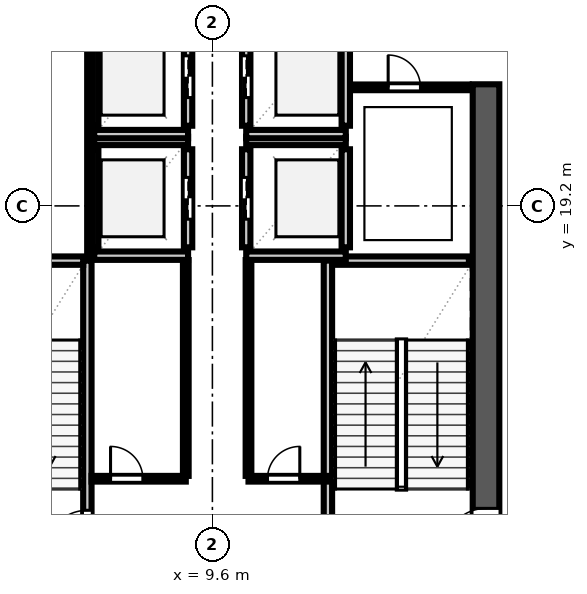
"""IFC4 building model, lengths in metres.
Left out: names, types, materials, properties, quantities, classifications, styles, units other than length and angle.
Written with IfcOpenShell. Run it as: python <this file> out.ifc"""

import sys

from ifc_helpers import new_model, si_unit, direction, frame, frame_2d, origin, place, context, subcontext, project, spatial, rectangle, extrude, element, fill, save


model = new_model("IFC4")
c1 = context("Model", 3, precision=1e-05, world=origin(), true_north=direction((0.0, 1.0)))
c2 = subcontext(c1, "Body", "Model", "MODEL_VIEW")
j1 = project(units=[si_unit("LENGTHUNIT", "METRE"), si_unit("PLANEANGLEUNIT", "RADIAN")], contexts=[c1])
p1 = place(None, origin())
s1 = spatial("IfcSite", under=j1, at=p1, CompositionType="ELEMENT")
p2 = place(p1, origin())
s2 = spatial("IfcBuilding", under=s1, at=p2, CompositionType="ELEMENT")
p3 = place(p2, frame((0.0, 0.0, 150.8)))
s3 = spatial("IfcBuildingStorey", under=s2, at=p3, CompositionType="ELEMENT", Elevation=150.8)
p4 = place(p3, frame((16.8, 9.95, 0.0), z_axis=(0.0, 0.0, 1.0), x_axis=(0.0, 1.0, 0.0)))
e1 = element("IfcWall", 1, at=p4, inside=s3, PredefinedType="SHEAR", context=c2, shape_type="SweptSolid", body=[
    extrude(rectangle(XDim=12.45, YDim=0.7, at=frame_2d((6.225, 0.0))), origin(), (0.0, 0.0, 1.0), 4.94),
])
p5 = place(p4, frame((0.19, 0.0, 0.0)))
e2 = element("IfcOpeningElement", 2, at=p5, cuts=e1, PredefinedType="OPENING", context=c2, shape_type="SweptSolid", body=[
    extrude(rectangle(XDim=1.1, YDim=2.2, at=frame_2d((0.55, 1.1))), frame((0.0, 0.362, 0.0), z_axis=(0.0, -1.0, 0.0), x_axis=(1.0, 0.0, 0.0)), (0.0, 0.0, 1.0), 0.724),
])
p6 = place(p3, frame((6.31, 9.95, 0.0), z_axis=(0.0, 0.0, 1.0), x_axis=(0.0, 1.0, 0.0)))
e3 = element("IfcWall", 3, at=p6, inside=s3, PredefinedType="SOLIDWALL", context=c2, shape_type="SweptSolid", body=[
    extrude(rectangle(XDim=7.81, YDim=0.22, at=frame_2d((3.905, 0.0))), origin(), (0.0, 0.0, 1.0), 4.94),
])
p7 = place(p6, frame((0.14, 0.0, 0.0)))
e4 = element("IfcOpeningElement", 4, at=p7, cuts=e3, PredefinedType="OPENING", context=c2, shape_type="SweptSolid", body=[
    extrude(rectangle(XDim=1.1, YDim=2.2, at=frame_2d((0.55, 1.1))), frame((0.0, 0.122, 0.0), z_axis=(0.0, -1.0, 0.0), x_axis=(1.0, 0.0, 0.0)), (0.0, 0.0, 1.0), 0.244),
])
p8 = place(p3, frame((2.65, 17.76, 0.0), z_axis=(0.0, 0.0, 1.0), x_axis=(1.0, 0.0, 0.0)))
e5 = element("IfcWall", 5, at=p8, inside=s3, PredefinedType="SOLIDWALL", context=c2, shape_type="SweptSolid", body=[
    extrude(rectangle(XDim=3.55, YDim=0.22, at=frame_2d((1.775, 0.0))), origin(), (0.0, 0.0, 1.0), 4.94),
])
p9 = place(p3, frame((12.64, 10.05, 0.0), z_axis=(0.0, 0.0, 1.0), x_axis=(0.0, 1.0, 0.0)))
e6 = element("IfcWall", 6, at=p9, inside=s3, PredefinedType="SOLIDWALL", context=c2, shape_type="SweptSolid", body=[
    extrude(rectangle(XDim=7.71, YDim=0.22, at=frame_2d((3.855, 0.0))), origin(), (0.0, 0.0, 1.0), 4.94),
])
p10 = place(p3, frame((12.75, 17.76, 0.0), z_axis=(0.0, 0.0, 1.0), x_axis=(1.0, 0.0, 0.0)))
e7 = element("IfcWall", 7, at=p10, inside=s3, PredefinedType="SOLIDWALL", context=c2, shape_type="SweptSolid", body=[
    extrude(rectangle(XDim=3.6, YDim=0.22, at=frame_2d((1.8, 0.0))), origin(), (0.0, 0.0, 1.0), 4.94),
])
p11 = place(p3, frame((6.49, 18.11, 0.0), z_axis=(0.0, 0.0, 1.0), x_axis=(0.0, 1.0, 0.0)))
e8 = element("IfcWall", 8, at=p11, inside=s3, PredefinedType="SOLIDWALL", context=c2, shape_type="SweptSolid", body=[
    extrude(rectangle(XDim=2.58, YDim=0.22, at=frame_2d((1.29, 0.0))), origin(), (0.0, 0.0, 1.0), 4.94),
])
p12 = place(p3, frame((8.96, 18.11, 0.0), z_axis=(0.0, 0.0, 1.0), x_axis=(0.0, 1.0, 0.0)))
e9 = element("IfcWall", 9, at=p12, inside=s3, PredefinedType="SOLIDWALL", context=c2, shape_type="SweptSolid", body=[
    extrude(rectangle(XDim=2.58, YDim=0.22, at=frame_2d((1.29, 0.0))), origin(), (0.0, 0.0, 1.0), 4.94),
])
p13 = place(p12, frame((0.74, 0.0, 0.0)))
e10 = element("IfcOpeningElement", 10, at=p13, cuts=e9, PredefinedType="OPENING", context=c2, shape_type="SweptSolid", body=[
    extrude(rectangle(XDim=1.1, YDim=2.2, at=frame_2d((0.55, 1.1))), frame((0.0, 0.122, 0.0), z_axis=(0.0, -1.0, 0.0), x_axis=(1.0, 0.0, 0.0)), (0.0, 0.0, 1.0), 0.244),
])
for number, where, z_axis, x_axis in (
    (11, (6.49, 17.89, 0.0), (0.0, 0.0, 1.0), (1.0, 0.0, 0.0)),
    (12, (6.49, 20.91, 0.0), (0.0, 0.0, 1.0), (1.0, 0.0, 0.0)),
):
    element("IfcWall", number, at=place(p3, frame(where, z_axis=z_axis, x_axis=x_axis)), inside=s3, PredefinedType="SOLIDWALL", context=c2, shape_type="SweptSolid", body=[
        extrude(rectangle(XDim=2.47, YDim=0.22, at=frame_2d((1.235, 0.0))), origin(), (0.0, 0.0, 1.0), 4.94),
    ])
p14 = place(p3, frame((6.49, 21.31, 0.0), z_axis=(0.0, 0.0, 1.0), x_axis=(0.0, 1.0, 0.0)))
e13 = element("IfcWall", 13, at=p14, inside=s3, PredefinedType="SOLIDWALL", context=c2, shape_type="SweptSolid", body=[
    extrude(rectangle(XDim=2.58, YDim=0.22, at=frame_2d((1.29, 0.0))), origin(), (0.0, 0.0, 1.0), 4.94),
])
p15 = place(p3, frame((8.96, 21.31, 0.0), z_axis=(0.0, 0.0, 1.0), x_axis=(0.0, 1.0, 0.0)))
e14 = element("IfcWall", 14, at=p15, inside=s3, PredefinedType="SOLIDWALL", context=c2, shape_type="SweptSolid", body=[
    extrude(rectangle(XDim=2.58, YDim=0.22, at=frame_2d((1.29, 0.0))), origin(), (0.0, 0.0, 1.0), 4.94),
])
p16 = place(p15, frame((0.74, 0.0, 0.0)))
e15 = element("IfcOpeningElement", 15, at=p16, cuts=e14, PredefinedType="OPENING", context=c2, shape_type="SweptSolid", body=[
    extrude(rectangle(XDim=1.1, YDim=2.2, at=frame_2d((0.55, 1.1))), frame((0.0, 0.122, 0.0), z_axis=(0.0, -1.0, 0.0), x_axis=(1.0, 0.0, 0.0)), (0.0, 0.0, 1.0), 0.244),
])
p17 = place(p3, frame((6.49, 21.09, 0.0), z_axis=(0.0, 0.0, 1.0), x_axis=(1.0, 0.0, 0.0)))
e16 = element("IfcWall", 16, at=p17, inside=s3, PredefinedType="SOLIDWALL", context=c2, shape_type="SweptSolid", body=[
    extrude(rectangle(XDim=2.47, YDim=0.22, at=frame_2d((1.235, 0.0))), origin(), (0.0, 0.0, 1.0), 4.94),
])
p18 = place(p3, frame((10.49, 18.11, 0.0), z_axis=(0.0, 0.0, 1.0), x_axis=(0.0, 1.0, 0.0)))
e17 = element("IfcWall", 17, at=p18, inside=s3, PredefinedType="SOLIDWALL", context=c2, shape_type="SweptSolid", body=[
    extrude(rectangle(XDim=2.58, YDim=0.22, at=frame_2d((1.29, 0.0))), origin(), (0.0, 0.0, 1.0), 4.94),
])
p19 = place(p18, frame((0.74, 0.0, 0.0)))
e18 = element("IfcOpeningElement", 18, at=p19, cuts=e17, PredefinedType="OPENING", context=c2, shape_type="SweptSolid", body=[
    extrude(rectangle(XDim=1.1, YDim=2.2, at=frame_2d((0.55, 1.1))), frame((0.0, 0.122, 0.0), z_axis=(0.0, -1.0, 0.0), x_axis=(1.0, 0.0, 0.0)), (0.0, 0.0, 1.0), 0.244),
])
p20 = place(p3, frame((13.11, 18.11, 0.0), z_axis=(0.0, 0.0, 1.0), x_axis=(0.0, 1.0, 0.0)))
e19 = element("IfcWall", 19, at=p20, inside=s3, PredefinedType="SOLIDWALL", context=c2, shape_type="SweptSolid", body=[
    extrude(rectangle(XDim=2.58, YDim=0.22, at=frame_2d((1.29, 0.0))), origin(), (0.0, 0.0, 1.0), 4.94),
])
for number, where, z_axis, x_axis in (
    (20, (10.49, 17.89, 0.0), (0.0, 0.0, 1.0), (1.0, 0.0, 0.0)),
    (21, (10.49, 20.91, 0.0), (0.0, 0.0, 1.0), (1.0, 0.0, 0.0)),
):
    element("IfcWall", number, at=place(p3, frame(where, z_axis=z_axis, x_axis=x_axis)), inside=s3, PredefinedType="SOLIDWALL", context=c2, shape_type="SweptSolid", body=[
        extrude(rectangle(XDim=2.62, YDim=0.22, at=frame_2d((1.31, 0.0))), origin(), (0.0, 0.0, 1.0), 4.94),
    ])
p21 = place(p3, frame((10.49, 21.31, 0.0), z_axis=(0.0, 0.0, 1.0), x_axis=(0.0, 1.0, 0.0)))
e22 = element("IfcWall", 22, at=p21, inside=s3, PredefinedType="SOLIDWALL", context=c2, shape_type="SweptSolid", body=[
    extrude(rectangle(XDim=2.58, YDim=0.22, at=frame_2d((1.29, 0.0))), origin(), (0.0, 0.0, 1.0), 4.94),
])
p22 = place(p21, frame((0.74, 0.0, 0.0)))
e23 = element("IfcOpeningElement", 23, at=p22, cuts=e22, PredefinedType="OPENING", context=c2, shape_type="SweptSolid", body=[
    extrude(rectangle(XDim=1.1, YDim=2.2, at=frame_2d((0.55, 1.1))), frame((0.0, 0.122, 0.0), z_axis=(0.0, -1.0, 0.0), x_axis=(1.0, 0.0, 0.0)), (0.0, 0.0, 1.0), 0.244),
])
p23 = place(p3, frame((13.11, 21.31, 0.0), z_axis=(0.0, 0.0, 1.0), x_axis=(0.0, 1.0, 0.0)))
e24 = element("IfcWall", 24, at=p23, inside=s3, PredefinedType="SOLIDWALL", context=c2, shape_type="SweptSolid", body=[
    extrude(rectangle(XDim=2.58, YDim=0.22, at=frame_2d((1.29, 0.0))), origin(), (0.0, 0.0, 1.0), 4.94),
])
p24 = place(p3, frame((10.49, 21.09, 0.0), z_axis=(0.0, 0.0, 1.0), x_axis=(1.0, 0.0, 0.0)))
e25 = element("IfcWall", 25, at=p24, inside=s3, PredefinedType="SOLIDWALL", context=c2, shape_type="SweptSolid", body=[
    extrude(rectangle(XDim=2.62, YDim=0.22, at=frame_2d((1.31, 0.0))), origin(), (0.0, 0.0, 1.0), 4.94),
])
p25 = place(p3, frame((6.42, 12.02, 0.0), z_axis=(0.0, 0.0, 1.0), x_axis=(1.0, 0.0, 0.0)))
e26 = element("IfcWall", 26, at=p25, inside=s3, PredefinedType="PARTITIONING", context=c2, shape_type="SweptSolid", body=[
    extrude(rectangle(XDim=2.48, YDim=0.15, at=frame_2d((1.24, 0.0))), origin(), (0.0, 0.0, 1.0), 4.94),
])
p26 = place(p25, frame((0.5, 0.0, 0.0)))
e27 = element("IfcOpeningElement", 27, at=p26, cuts=e26, PredefinedType="OPENING", context=c2, shape_type="SweptSolid", body=[
    extrude(rectangle(XDim=0.85, YDim=2.1, at=frame_2d((0.425, 1.05))), frame((0.0, 0.087, 0.0), z_axis=(0.0, -1.0, 0.0), x_axis=(1.0, 0.0, 0.0)), (0.0, 0.0, 1.0), 0.174),
])
p27 = place(p3, frame((10.55, 12.02, 0.0), z_axis=(0.0, 0.0, 1.0), x_axis=(1.0, 0.0, 0.0)))
e28 = element("IfcWall", 28, at=p27, inside=s3, PredefinedType="PARTITIONING", context=c2, shape_type="SweptSolid", body=[
    extrude(rectangle(XDim=2.08, YDim=0.15, at=frame_2d((1.04, 0.0))), origin(), (0.0, 0.0, 1.0), 4.94),
])
p28 = place(p27, frame((0.5, 0.0, 0.0)))
e29 = element("IfcOpeningElement", 29, at=p28, cuts=e28, PredefinedType="OPENING", context=c2, shape_type="SweptSolid", body=[
    extrude(rectangle(XDim=0.85, YDim=2.1, at=frame_2d((0.425, 1.05))), frame((0.0, 0.087, 0.0), z_axis=(0.0, -1.0, 0.0), x_axis=(1.0, 0.0, 0.0)), (0.0, 0.0, 1.0), 0.174),
])
for number, where, z_axis, x_axis in (
    (30, (8.9, 12.095, 0.0), (0.0, 0.0, 1.0), (0.0, 1.0, 0.0)),
    (31, (10.55, 12.095, 0.0), (0.0, 0.0, 1.0), (0.0, 1.0, 0.0)),
):
    element("IfcWall", number, at=place(p3, frame(where, z_axis=z_axis, x_axis=x_axis)), inside=s3, PredefinedType="PARTITIONING", context=c2, shape_type="SweptSolid", body=[
        extrude(rectangle(XDim=5.68, YDim=0.15, at=frame_2d((2.84, 0.0))), origin(), (0.0, 0.0, 1.0), 4.94),
    ])
p29 = place(p3, frame((13.225, 22.32, 0.0), z_axis=(0.0, 0.0, 1.0), x_axis=(1.0, 0.0, 0.0)))
e32 = element("IfcWall", 32, at=p29, inside=s3, PredefinedType="PARTITIONING", context=c2, shape_type="SweptSolid", body=[
    extrude(rectangle(XDim=3.12, YDim=0.15, at=frame_2d((1.56, 0.0))), origin(), (0.0, 0.0, 1.0), 4.94),
])
p30 = place(p29, frame((1.0, 0.0, 0.0)))
e33 = element("IfcOpeningElement", 33, at=p30, cuts=e32, PredefinedType="OPENING", context=c2, shape_type="SweptSolid", body=[
    extrude(rectangle(XDim=0.85, YDim=2.1, at=frame_2d((0.425, 1.05))), frame((0.0, 0.087, 0.0), z_axis=(0.0, -1.0, 0.0), x_axis=(1.0, 0.0, 0.0)), (0.0, 0.0, 1.0), 0.174),
])
p31 = place(p3, frame((6.38, 17.8, 0.0), z_axis=(0.0, 0.0, 1.0), x_axis=(0.0, 1.0, 0.0)))
e34 = element("IfcWall", 34, at=p31, inside=s3, PredefinedType="PARTITIONING", context=c2, shape_type="SweptSolid", body=[
    extrude(rectangle(XDim=18.98, YDim=0.15, at=frame_2d((9.49, 0.0))), origin(), (0.0, 0.0, 1.0), 4.94),
])
p32 = place(p31, frame((14.3, 0.0, 0.0)))
e35 = element("IfcOpeningElement", 35, at=p32, cuts=e34, PredefinedType="OPENING", context=c2, shape_type="SweptSolid", body=[
    extrude(rectangle(XDim=0.85, YDim=2.1, at=frame_2d((0.425, 1.05))), frame((0.0, 0.087, 0.0), z_axis=(0.0, -1.0, 0.0), x_axis=(1.0, 0.0, 0.0)), (0.0, 0.0, 1.0), 0.174),
])
p33 = place(p7, origin())
e36 = element("IfcDoor", 36, at=p33, inside=s3, OperationType="SINGLE_SWING_LEFT", PredefinedType="DOOR", context=c2, shape_type="SweptSolid", body=[
    extrude(rectangle(XDim=1.1, YDim=2.2, at=frame_2d((0.55, 1.1))), frame((0.0, 0.025, 0.0), z_axis=(0.0, -1.0, 0.0), x_axis=(1.0, 0.0, 0.0)), (0.0, 0.0, 1.0), 0.05),
])
fill(e4, e36)
p34 = place(p5, origin())
e37 = element("IfcDoor", 37, at=p34, inside=s3, OperationType="SINGLE_SWING_LEFT", PredefinedType="DOOR", context=c2, shape_type="SweptSolid", body=[
    extrude(rectangle(XDim=1.1, YDim=2.2, at=frame_2d((0.55, 1.1))), frame((0.0, 0.025, 0.0), z_axis=(0.0, -1.0, 0.0), x_axis=(1.0, 0.0, 0.0)), (0.0, 0.0, 1.0), 0.05),
])
fill(e2, e37)
p35 = place(p13, origin())
e38 = element("IfcDoor", 38, at=p35, inside=s3, OperationType="DOUBLE_DOOR_SLIDING", PredefinedType="DOOR", context=c2, shape_type="SweptSolid", body=[
    extrude(rectangle(XDim=1.1, YDim=2.2, at=frame_2d((0.55, 1.1))), frame((0.0, 0.025, 0.0), z_axis=(0.0, -1.0, 0.0), x_axis=(1.0, 0.0, 0.0)), (0.0, 0.0, 1.0), 0.05),
])
fill(e10, e38)
p36 = place(p16, origin())
e39 = element("IfcDoor", 39, at=p36, inside=s3, OperationType="DOUBLE_DOOR_SLIDING", PredefinedType="DOOR", context=c2, shape_type="SweptSolid", body=[
    extrude(rectangle(XDim=1.1, YDim=2.2, at=frame_2d((0.55, 1.1))), frame((0.0, 0.025, 0.0), z_axis=(0.0, -1.0, 0.0), x_axis=(1.0, 0.0, 0.0)), (0.0, 0.0, 1.0), 0.05),
])
fill(e15, e39)
p37 = place(p19, origin())
e40 = element("IfcDoor", 40, at=p37, inside=s3, OperationType="DOUBLE_DOOR_SLIDING", PredefinedType="DOOR", context=c2, shape_type="SweptSolid", body=[
    extrude(rectangle(XDim=1.1, YDim=2.2, at=frame_2d((0.55, 1.1))), frame((0.0, 0.025, 0.0), z_axis=(0.0, -1.0, 0.0), x_axis=(1.0, 0.0, 0.0)), (0.0, 0.0, 1.0), 0.05),
])
fill(e18, e40)
p38 = place(p22, origin())
e41 = element("IfcDoor", 41, at=p38, inside=s3, OperationType="DOUBLE_DOOR_SLIDING", PredefinedType="DOOR", context=c2, shape_type="SweptSolid", body=[
    extrude(rectangle(XDim=1.1, YDim=2.2, at=frame_2d((0.55, 1.1))), frame((0.0, 0.025, 0.0), z_axis=(0.0, -1.0, 0.0), x_axis=(1.0, 0.0, 0.0)), (0.0, 0.0, 1.0), 0.05),
])
fill(e23, e41)
p39 = place(p26, origin())
e42 = element("IfcDoor", 42, at=p39, inside=s3, OperationType="SINGLE_SWING_LEFT", PredefinedType="DOOR", context=c2, shape_type="SweptSolid", body=[
    extrude(rectangle(XDim=0.85, YDim=2.1, at=frame_2d((0.425, 1.05))), frame((0.0, 0.025, 0.0), z_axis=(0.0, -1.0, 0.0), x_axis=(1.0, 0.0, 0.0)), (0.0, 0.0, 1.0), 0.05),
])
fill(e27, e42)
p40 = place(p28, origin())
e43 = element("IfcDoor", 43, at=p40, inside=s3, OperationType="SINGLE_SWING_RIGHT", PredefinedType="DOOR", context=c2, shape_type="SweptSolid", body=[
    extrude(rectangle(XDim=0.85, YDim=2.1, at=frame_2d((0.425, 1.05))), frame((0.0, 0.025, 0.0), z_axis=(0.0, -1.0, 0.0), x_axis=(1.0, 0.0, 0.0)), (0.0, 0.0, 1.0), 0.05),
])
fill(e29, e43)
p41 = place(p30, origin())
e44 = element("IfcDoor", 44, at=p41, inside=s3, OperationType="SINGLE_SWING_LEFT", PredefinedType="DOOR", context=c2, shape_type="SweptSolid", body=[
    extrude(rectangle(XDim=0.85, YDim=2.1, at=frame_2d((0.425, 1.05))), frame((0.0, 0.025, 0.0), z_axis=(0.0, -1.0, 0.0), x_axis=(1.0, 0.0, 0.0)), (0.0, 0.0, 1.0), 0.05),
])
fill(e33, e44)
save(model, sys.argv[1])
